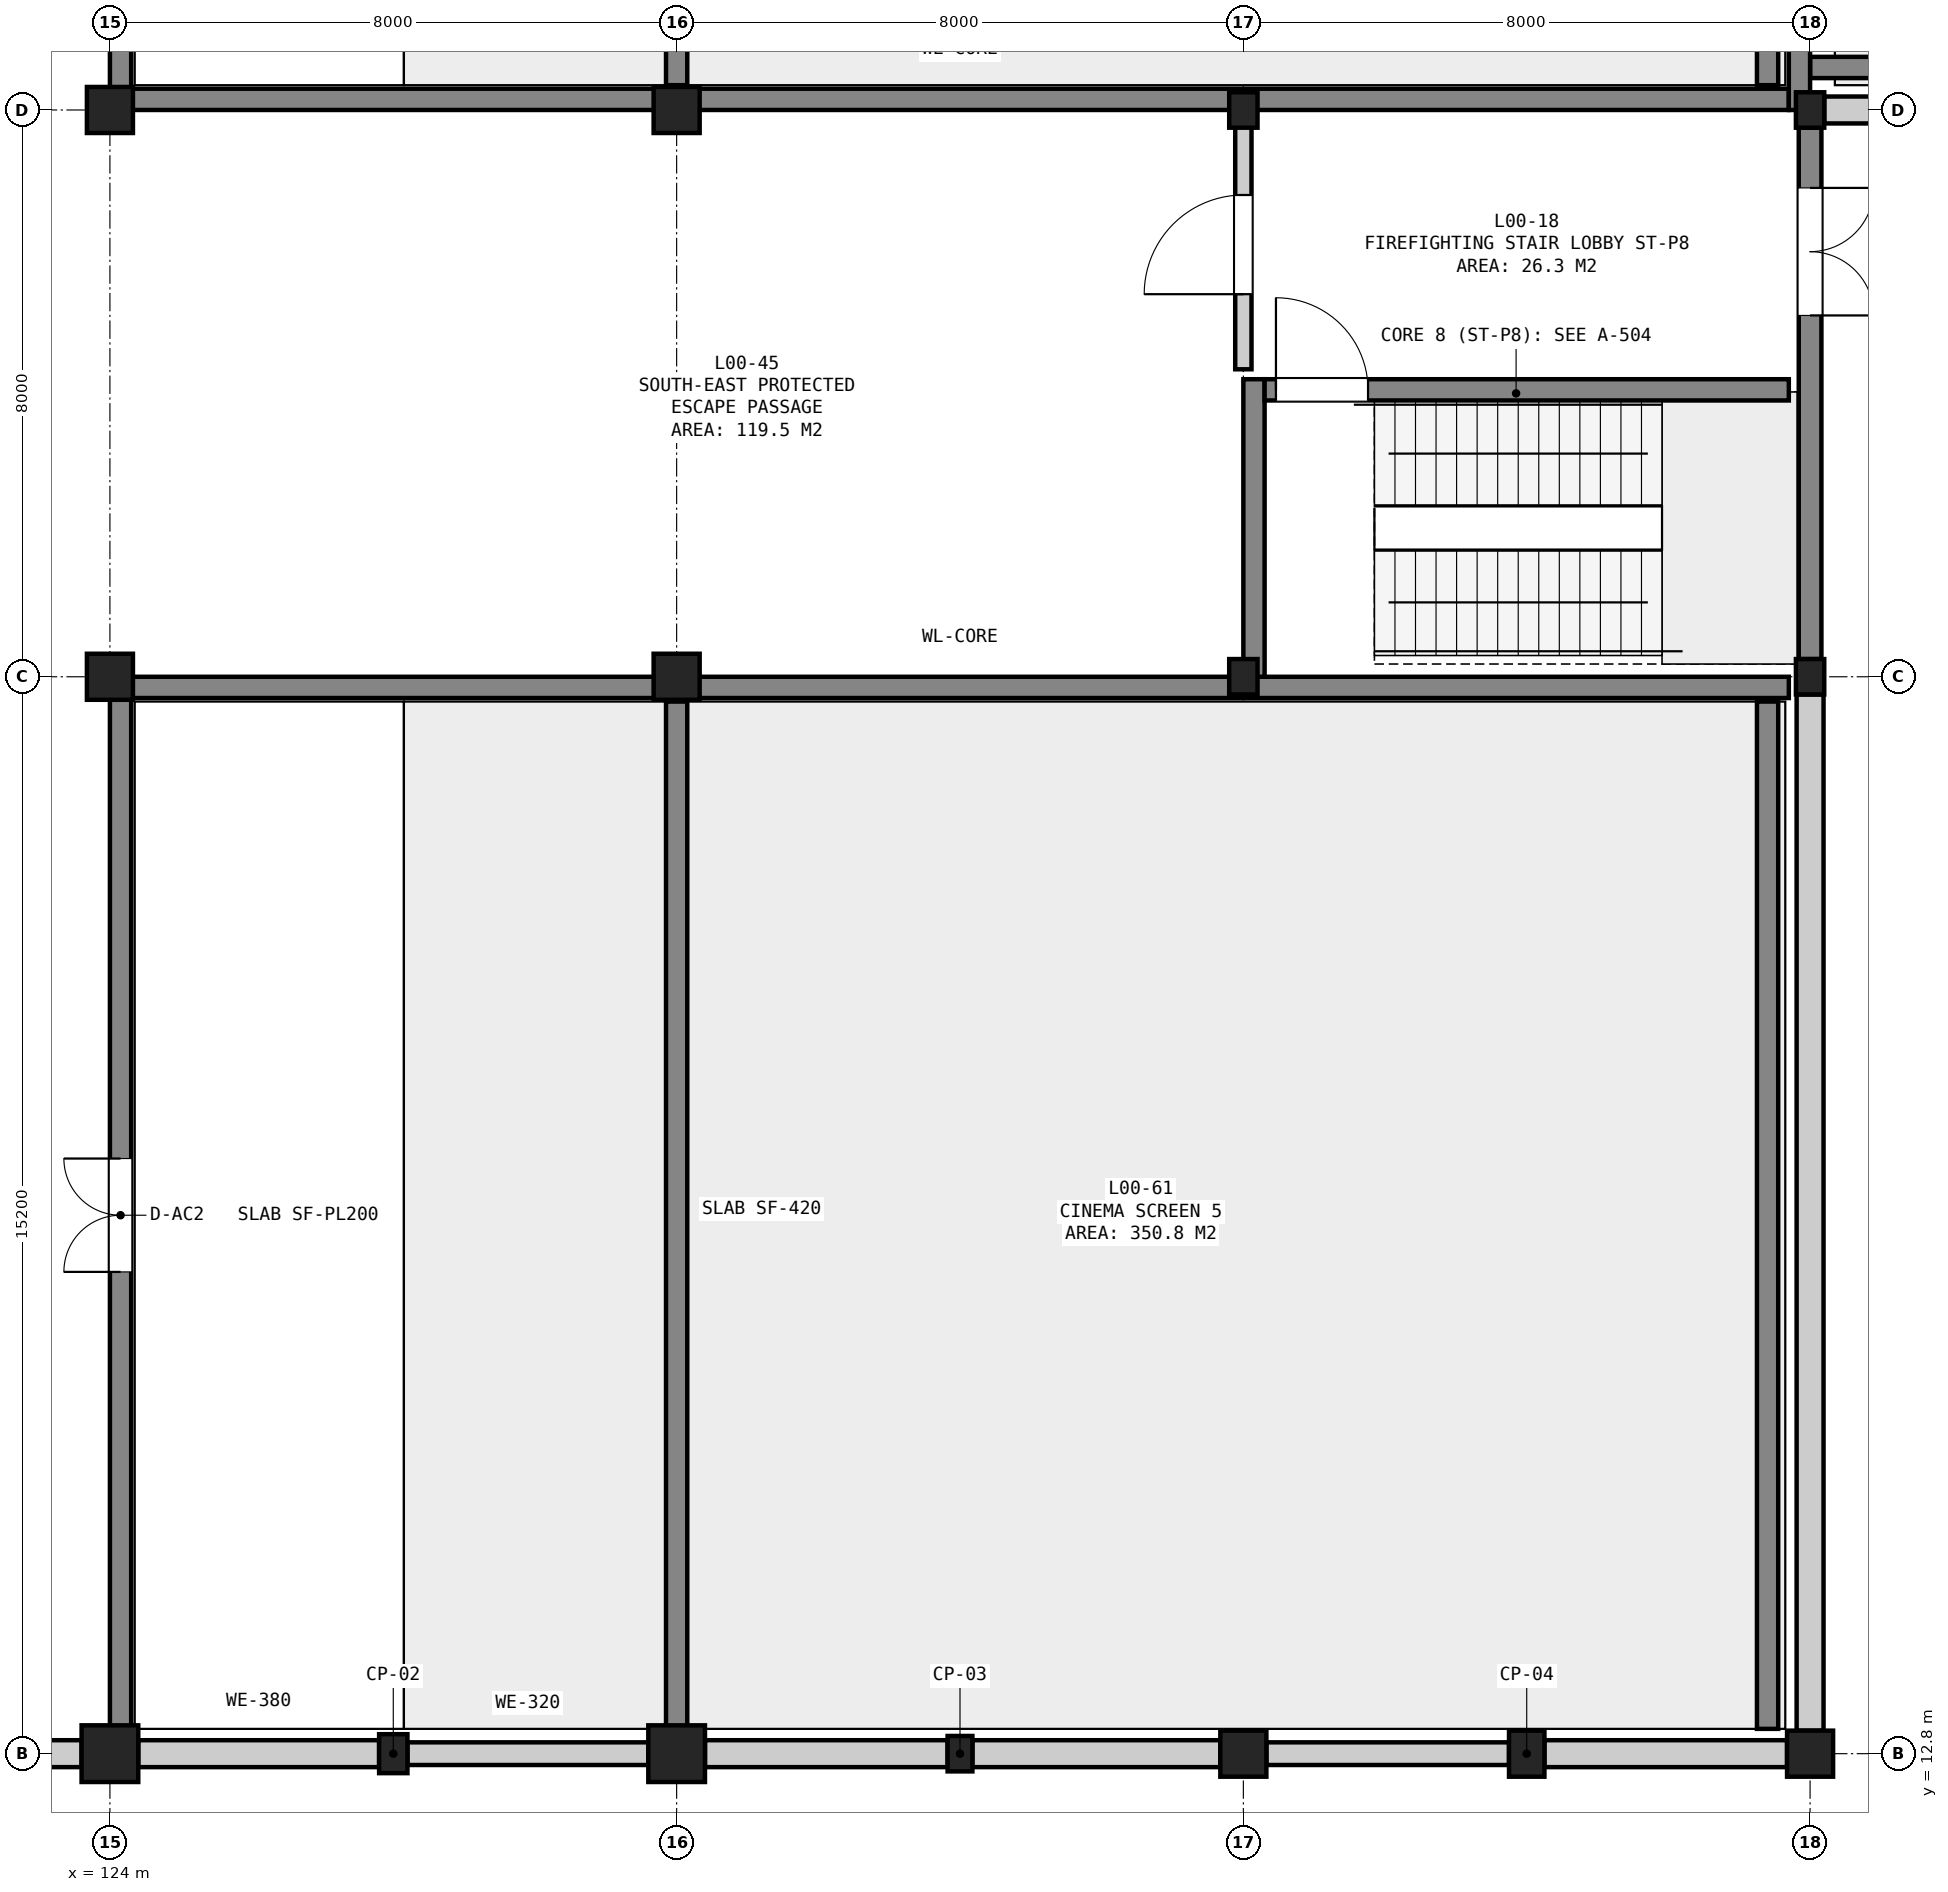
"""IFC4 building model, lengths in metres.
Left out: names, types, materials, properties, quantities, classifications, styles, units other than length and angle.
Written with IfcOpenShell. Run it as: python <this file> out.ifc"""

import sys

from ifc_helpers import new_model, si_unit, direction, frame, frame_2d, origin, origin_2d, place, context, subcontext, project, spatial, rectangle, extrude, element, fill, save


model = new_model("IFC4")
c1 = context("Model", 3, precision=1e-05, world=origin(), true_north=direction((0.0, 1.0)))
c2 = subcontext(c1, "Body", "Model", "MODEL_VIEW")
j1 = project(units=[si_unit("LENGTHUNIT", "METRE"), si_unit("PLANEANGLEUNIT", "RADIAN")], contexts=[c1])
p1 = place(None, origin())
s1 = spatial("IfcSite", under=j1, at=p1, CompositionType="ELEMENT")
p2 = place(p1, origin())
s2 = spatial("IfcBuilding", under=s1, at=p2, CompositionType="ELEMENT")
p3 = place(p2, origin())
s3 = spatial("IfcBuildingStorey", under=s2, at=p3, CompositionType="ELEMENT", Elevation=0.0)
p4 = place(p3, frame((124.0, 12.8, 0.0), z_axis=(0.0, 0.0, 1.0), x_axis=(1.0, 0.0, 0.0)))
e1 = element("IfcColumn", 1, at=p4, inside=s3, PredefinedType="COLUMN", context=c2, shape_type="SweptSolid", body=[
    extrude(rectangle(XDim=0.8, YDim=0.8, at=origin_2d()), origin(), (0.0, 0.0, 1.0), 5.4),
])
for number, where, z_axis, x_axis in (
    (2, (124.0, 28.0, 0.0), (0.0, 0.0, 1.0), (1.0, 0.0, 0.0)),
    (3, (124.0, 36.0, 0.0), (0.0, 0.0, 1.0), (1.0, 0.0, 0.0)),
):
    element("IfcColumn", number, at=place(p3, frame(where, z_axis=z_axis, x_axis=x_axis)), inside=s3, PredefinedType="COLUMN", context=c2, shape_type="SweptSolid", body=[
        extrude(rectangle(XDim=0.65, YDim=0.65, at=origin_2d()), origin(), (0.0, 0.0, 1.0), 5.4),
    ])
p5 = place(p3, frame((132.0, 12.8, 0.0), z_axis=(0.0, 0.0, 1.0), x_axis=(1.0, 0.0, 0.0)))
e4 = element("IfcColumn", 4, at=p5, inside=s3, PredefinedType="COLUMN", context=c2, shape_type="SweptSolid", body=[
    extrude(rectangle(XDim=0.8, YDim=0.8, at=origin_2d()), origin(), (0.0, 0.0, 1.0), 5.4),
])
for number, where, z_axis, x_axis in (
    (5, (132.0, 28.0, 0.0), (0.0, 0.0, 1.0), (1.0, 0.0, 0.0)),
    (6, (132.0, 36.0, 0.0), (0.0, 0.0, 1.0), (1.0, 0.0, 0.0)),
    (7, (140.0, 12.8, 0.0), (0.0, 0.0, 1.0), (1.0, 0.0, 0.0)),
):
    element("IfcColumn", number, at=place(p3, frame(where, z_axis=z_axis, x_axis=x_axis)), inside=s3, PredefinedType="COLUMN", context=c2, shape_type="SweptSolid", body=[
        extrude(rectangle(XDim=0.65, YDim=0.65, at=origin_2d()), origin(), (0.0, 0.0, 1.0), 5.4),
    ])
for number, where, z_axis, x_axis in (
    (8, (140.0, 28.0, 0.0), (0.0, 0.0, 1.0), (1.0, 0.0, 0.0)),
    (9, (140.0, 36.0, 0.0), (0.0, 0.0, 1.0), (1.0, 0.0, 0.0)),
):
    element("IfcColumn", number, at=place(p3, frame(where, z_axis=z_axis, x_axis=x_axis)), inside=s3, PredefinedType="COLUMN", context=c2, shape_type="SweptSolid", body=[
        extrude(rectangle(XDim=0.4, YDim=0.5, at=origin_2d()), origin(), (0.0, 0.0, 1.0), 5.4),
    ])
p6 = place(p3, frame((148.0, 12.8, 0.0), z_axis=(0.0, 0.0, 1.0), x_axis=(1.0, 0.0, 0.0)))
e10 = element("IfcColumn", 10, at=p6, inside=s3, PredefinedType="COLUMN", context=c2, shape_type="SweptSolid", body=[
    extrude(rectangle(XDim=0.65, YDim=0.65, at=origin_2d()), origin(), (0.0, 0.0, 1.0), 5.4),
])
for number, where, z_axis, x_axis in (
    (11, (148.0, 28.0, 0.0), (0.0, 0.0, 1.0), (1.0, 0.0, 0.0)),
    (12, (148.0, 36.0, 0.0), (0.0, 0.0, 1.0), (1.0, 0.0, 0.0)),
):
    element("IfcColumn", number, at=place(p3, frame(where, z_axis=z_axis, x_axis=x_axis)), inside=s3, PredefinedType="COLUMN", context=c2, shape_type="SweptSolid", body=[
        extrude(rectangle(XDim=0.4, YDim=0.5, at=origin_2d()), origin(), (0.0, 0.0, 1.0), 5.4),
    ])
p7 = place(p3, frame((128.0, 12.8, 0.0), z_axis=(0.0, 0.0, 1.0), x_axis=(1.0, 0.0, 0.0)))
e13 = element("IfcColumn", 13, at=p7, inside=s3, PredefinedType="PILASTER", context=c2, shape_type="SweptSolid", body=[
    extrude(rectangle(XDim=0.4, YDim=0.55, at=origin_2d()), origin(), (0.0, 0.0, 1.0), 5.4),
])
p8 = place(p3, frame((136.0, 12.8, 0.0), z_axis=(0.0, 0.0, 1.0), x_axis=(1.0, 0.0, 0.0)))
e14 = element("IfcColumn", 14, at=p8, inside=s3, PredefinedType="PILASTER", context=c2, shape_type="SweptSolid", body=[
    extrude(rectangle(XDim=0.35, YDim=0.5, at=origin_2d()), origin(), (0.0, 0.0, 1.0), 5.4),
])
p9 = place(p3, frame((144.0, 12.8, 0.0), z_axis=(0.0, 0.0, 1.0), x_axis=(1.0, 0.0, 0.0)))
e15 = element("IfcColumn", 15, at=p9, inside=s3, PredefinedType="PILASTER", context=c2, shape_type="SweptSolid", body=[
    extrude(rectangle(XDim=0.5, YDim=0.65, at=origin_2d()), origin(), (0.0, 0.0, 1.0), 5.4),
])
p10 = place(p3, frame((132.0, 13.15, 0.0), z_axis=(0.0, 0.0, 1.0), x_axis=(0.0, 1.0, 0.0)))
e16 = element("IfcWall", 16, at=p10, inside=s3, PredefinedType="SHEAR", context=c2, shape_type="SweptSolid", body=[
    extrude(rectangle(XDim=14.5, YDim=0.3, at=frame_2d((7.25, 0.0))), origin(), (0.0, 0.0, 1.0), 0.75),
])
p11 = place(p3, frame((147.4, 13.15, 0.0), z_axis=(0.0, 0.0, 1.0), x_axis=(0.0, 1.0, 0.0)))
e17 = element("IfcWall", 17, at=p11, inside=s3, PredefinedType="SHEAR", context=c2, shape_type="SweptSolid", body=[
    extrude(rectangle(XDim=14.5, YDim=0.3, at=frame_2d((7.25, 0.0))), origin(), (0.0, 0.0, 1.0), 2.871),
])
p12 = place(p3, frame((132.0, 36.35, 0.0), z_axis=(0.0, 0.0, 1.0), x_axis=(0.0, 1.0, 0.0)))
e18 = element("IfcWall", 18, at=p12, inside=s3, PredefinedType="SHEAR", context=c2, shape_type="SweptSolid", body=[
    extrude(rectangle(XDim=14.5, YDim=0.3, at=frame_2d((7.25, 0.0))), origin(), (0.0, 0.0, 1.0), 0.75),
])
p13 = place(p3, frame((147.4, 36.35, 0.0), z_axis=(0.0, 0.0, 1.0), x_axis=(0.0, 1.0, 0.0)))
e19 = element("IfcWall", 19, at=p13, inside=s3, PredefinedType="SHEAR", context=c2, shape_type="SweptSolid", body=[
    extrude(rectangle(XDim=14.5, YDim=0.3, at=frame_2d((7.25, 0.0))), origin(), (0.0, 0.0, 1.0), 2.871),
])
p14 = place(p3, frame((148.0, 36.6, 0.0), z_axis=(0.0, 0.0, 1.0), x_axis=(1.0, 0.0, 0.0)))
e20 = element("IfcWall", 20, at=p14, inside=s3, PredefinedType="SHEAR", context=c2, shape_type="SweptSolid", body=[
    extrude(rectangle(XDim=13.25, YDim=0.3, at=frame_2d((6.625, 0.0))), origin(), (0.0, 0.0, 1.0), 2.816),
])
p15 = place(p3, frame((120.625, 12.8, 0.0), z_axis=(0.0, 0.0, 1.0), x_axis=(1.0, 0.0, 0.0)))
e21 = element("IfcWall", 21, at=p15, inside=s3, PredefinedType="SOLIDWALL", context=c2, shape_type="SweptSolid", body=[
    extrude(rectangle(XDim=2.975, YDim=0.38, at=frame_2d((1.488, 0.0))), origin(), (0.0, 0.0, 1.0), 4.48),
])
p16 = place(p15, frame((0.575, 0.0, 0.0)))
e22 = element("IfcOpeningElement", 22, at=p16, cuts=e21, PredefinedType="OPENING", context=c2, shape_type="SweptSolid", body=[
    extrude(rectangle(XDim=1.8, YDim=2.25, at=frame_2d((0.9, 1.125))), frame((0.0, 0.202, 0.0), z_axis=(0.0, -1.0, 0.0), x_axis=(1.0, 0.0, 0.0)), (0.0, 0.0, 1.0), 0.404),
])
p17 = place(p3, frame((124.4, 12.8, 0.0), z_axis=(0.0, 0.0, 1.0), x_axis=(1.0, 0.0, 0.0)))
e23 = element("IfcWall", 23, at=p17, inside=s3, PredefinedType="SOLIDWALL", context=c2, shape_type="SweptSolid", body=[
    extrude(rectangle(XDim=3.4, YDim=0.38, at=frame_2d((1.7, 0.0))), origin(), (0.0, 0.0, 1.0), 4.555),
])
p18 = place(p3, frame((128.2, 12.8, 0.0), z_axis=(0.0, 0.0, 1.0), x_axis=(1.0, 0.0, 0.0)))
e24 = element("IfcWall", 24, at=p18, inside=s3, PredefinedType="SOLIDWALL", context=c2, shape_type="SweptSolid", body=[
    extrude(rectangle(XDim=3.4, YDim=0.32, at=frame_2d((1.7, 0.0))), origin(), (0.0, 0.0, 1.0), 4.555),
])
p19 = place(p3, frame((132.4, 12.8, 0.0), z_axis=(0.0, 0.0, 1.0), x_axis=(1.0, 0.0, 0.0)))
e25 = element("IfcWall", 25, at=p19, inside=s3, PredefinedType="SOLIDWALL", context=c2, shape_type="SweptSolid", body=[
    extrude(rectangle(XDim=3.425, YDim=0.38, at=frame_2d((1.712, 0.0))), origin(), (0.0, 0.0, 1.0), 4.775),
])
p20 = place(p3, frame((136.175, 12.8, 0.0), z_axis=(0.0, 0.0, 1.0), x_axis=(1.0, 0.0, 0.0)))
e26 = element("IfcWall", 26, at=p20, inside=s3, PredefinedType="SOLIDWALL", context=c2, shape_type="SweptSolid", body=[
    extrude(rectangle(XDim=3.5, YDim=0.38, at=frame_2d((1.75, 0.0))), origin(), (0.0, 0.0, 1.0), 4.775),
])
p21 = place(p3, frame((140.325, 12.8, 0.0), z_axis=(0.0, 0.0, 1.0), x_axis=(1.0, 0.0, 0.0)))
e27 = element("IfcWall", 27, at=p21, inside=s3, PredefinedType="SOLIDWALL", context=c2, shape_type="SweptSolid", body=[
    extrude(rectangle(XDim=3.425, YDim=0.32, at=frame_2d((1.712, 0.0))), origin(), (0.0, 0.0, 1.0), 4.475),
])
p22 = place(p3, frame((144.25, 12.8, 0.0), z_axis=(0.0, 0.0, 1.0), x_axis=(1.0, 0.0, 0.0)))
e28 = element("IfcWall", 28, at=p22, inside=s3, PredefinedType="SOLIDWALL", context=c2, shape_type="SweptSolid", body=[
    extrude(rectangle(XDim=3.425, YDim=0.38, at=frame_2d((1.712, 0.0))), origin(), (0.0, 0.0, 1.0), 4.475),
])
p23 = place(p3, frame((148.0, 13.125, 0.0), z_axis=(0.0, 0.0, 1.0), x_axis=(0.0, 1.0, 0.0)))
e29 = element("IfcWall", 29, at=p23, inside=s3, PredefinedType="SOLIDWALL", context=c2, shape_type="SweptSolid", body=[
    extrude(rectangle(XDim=14.625, YDim=0.38, at=frame_2d((7.312, 0.0))), origin(), (0.0, 0.0, 1.0), 4.075),
])
p24 = place(p3, frame((148.0, 28.25, 0.0), z_axis=(0.0, 0.0, 1.0), x_axis=(0.0, 1.0, 0.0)))
e30 = element("IfcWall", 30, at=p24, inside=s3, PredefinedType="SOLIDWALL", context=c2, shape_type="SweptSolid", body=[
    extrude(rectangle(XDim=7.5, YDim=0.32, at=frame_2d((3.75, 0.0))), origin(), (0.0, 0.0, 1.0), 4.555),
])
p25 = place(p24, frame((4.85, 0.0, 0.0)))
e31 = element("IfcOpeningElement", 31, at=p25, cuts=e30, PredefinedType="OPENING", context=c2, shape_type="SweptSolid", body=[
    extrude(rectangle(XDim=1.8, YDim=2.25, at=frame_2d((0.9, 1.125))), frame((0.0, 0.172, 0.0), z_axis=(0.0, -1.0, 0.0), x_axis=(1.0, 0.0, 0.0)), (0.0, 0.0, 1.0), 0.344),
])
p26 = place(p3, frame((148.2, 36.0, 0.0), z_axis=(0.0, 0.0, 1.0), x_axis=(1.0, 0.0, 0.0)))
e32 = element("IfcWall", 32, at=p26, inside=s3, PredefinedType="SOLIDWALL", context=c2, shape_type="SweptSolid", body=[
    extrude(rectangle(XDim=13.0, YDim=0.38, at=frame_2d((6.5, 0.0))), origin(), (0.0, 0.0, 1.0), 4.025),
])
p27 = place(p3, frame((124.3, 27.85, 0.0), z_axis=(0.0, 0.0, 1.0), x_axis=(1.0, 0.0, 0.0)))
e33 = element("IfcWall", 33, at=p27, inside=s3, PredefinedType="SHEAR", context=c2, shape_type="SweptSolid", body=[
    extrude(rectangle(XDim=23.4, YDim=0.3, at=frame_2d((11.7, 0.0))), origin(), (0.0, 0.0, 1.0), 5.08),
])
p28 = place(p3, frame((124.15, 12.8, 0.0), z_axis=(0.0, 0.0, 1.0), x_axis=(0.0, 1.0, 0.0)))
e34 = element("IfcWall", 34, at=p28, inside=s3, PredefinedType="SHEAR", context=c2, shape_type="SweptSolid", body=[
    extrude(rectangle(XDim=15.2, YDim=0.3, at=frame_2d((7.6, 0.0))), origin(), (0.0, 0.0, 1.0), 5.08),
])
p29 = place(p28, frame((6.8, 0.0, 0.0)))
e35 = element("IfcOpeningElement", 35, at=p29, cuts=e34, PredefinedType="OPENING", context=c2, shape_type="SweptSolid", body=[
    extrude(rectangle(XDim=1.6, YDim=2.25, at=frame_2d((0.8, 1.125))), frame((0.0, 0.162, 0.0), z_axis=(0.0, -1.0, 0.0), x_axis=(1.0, 0.0, 0.0)), (0.0, 0.0, 1.0), 0.324),
])
p30 = place(p3, frame((124.3, 36.15, 0.0), z_axis=(0.0, 0.0, 1.0), x_axis=(1.0, 0.0, 0.0)))
e36 = element("IfcWall", 36, at=p30, inside=s3, PredefinedType="SHEAR", context=c2, shape_type="SweptSolid", body=[
    extrude(rectangle(XDim=23.4, YDim=0.3, at=frame_2d((11.7, 0.0))), origin(), (0.0, 0.0, 1.0), 5.08),
])
p31 = place(p3, frame((124.15, 36.0, 0.0), z_axis=(0.0, 0.0, 1.0), x_axis=(0.0, 1.0, 0.0)))
e37 = element("IfcWall", 37, at=p31, inside=s3, PredefinedType="SHEAR", context=c2, shape_type="SweptSolid", body=[
    extrude(rectangle(XDim=15.2, YDim=0.3, at=frame_2d((7.6, 0.0))), origin(), (0.0, 0.0, 1.0), 5.08),
])
p32 = place(p31, frame((10.4, 0.0, 0.0)))
e38 = element("IfcOpeningElement", 38, at=p32, cuts=e37, PredefinedType="OPENING", context=c2, shape_type="SweptSolid", body=[
    extrude(rectangle(XDim=1.6, YDim=2.25, at=frame_2d((0.8, 1.125))), frame((0.0, 0.162, 0.0), z_axis=(0.0, -1.0, 0.0), x_axis=(1.0, 0.0, 0.0)), (0.0, 0.0, 1.0), 0.324),
])
p33 = place(p3, frame((147.85, 36.0, 0.0), z_axis=(0.0, 0.0, 1.0), x_axis=(0.0, 1.0, 0.0)))
e39 = element("IfcWall", 39, at=p33, inside=s3, PredefinedType="SHEAR", context=c2, shape_type="SweptSolid", body=[
    extrude(rectangle(XDim=15.2, YDim=0.3, at=frame_2d((7.6, 0.0))), origin(), (0.0, 0.0, 1.0), 5.08),
])
p34 = place(p3, frame((140.15, 28.0, 0.0), z_axis=(0.0, 0.0, 1.0), x_axis=(0.0, 1.0, 0.0)))
e40 = element("IfcWall", 40, at=p34, inside=s3, PredefinedType="SHEAR", context=c2, shape_type="SweptSolid", body=[
    extrude(rectangle(XDim=4.2, YDim=0.3, at=frame_2d((2.1, 0.0))), origin(), (0.0, 0.0, 1.0), 5.08),
])
p35 = place(p3, frame((140.3, 32.05, 0.0), z_axis=(0.0, 0.0, 1.0), x_axis=(1.0, 0.0, 0.0)))
e41 = element("IfcWall", 41, at=p35, inside=s3, PredefinedType="SHEAR", context=c2, shape_type="SweptSolid", body=[
    extrude(rectangle(XDim=7.4, YDim=0.3, at=frame_2d((3.7, 0.0))), origin(), (0.0, 0.0, 1.0), 5.08),
])
p36 = place(p35, frame((0.16, 0.0, 0.0)))
e42 = element("IfcOpeningElement", 42, at=p36, cuts=e41, PredefinedType="OPENING", context=c2, shape_type="SweptSolid", body=[
    extrude(rectangle(XDim=1.3, YDim=2.18, at=frame_2d((0.65, 1.09))), frame((0.0, 0.162, 0.0), z_axis=(0.0, -1.0, 0.0), x_axis=(1.0, 0.0, 0.0)), (0.0, 0.0, 1.0), 0.324),
])
p37 = place(p3, frame((140.0, 32.34, 0.0), z_axis=(0.0, 0.0, 1.0), x_axis=(0.0, 1.0, 0.0)))
e43 = element("IfcWall", 43, at=p37, inside=s3, PredefinedType="SOLIDWALL", context=c2, shape_type="SweptSolid", body=[
    extrude(rectangle(XDim=3.52, YDim=0.23, at=frame_2d((1.76, 0.0))), origin(), (0.0, 0.0, 1.0), 4.575),
])
p38 = place(p37, frame((1.06, 0.0, 0.0)))
e44 = element("IfcOpeningElement", 44, at=p38, cuts=e43, PredefinedType="OPENING", context=c2, shape_type="SweptSolid", body=[
    extrude(rectangle(XDim=1.4, YDim=2.2, at=frame_2d((0.7, 1.1))), frame((0.0, 0.127, 0.0), z_axis=(0.0, -1.0, 0.0), x_axis=(1.0, 0.0, 0.0)), (0.0, 0.0, 1.0), 0.254),
])
p39 = place(p25, frame((1.8, 0.0, 0.0), z_axis=(0.0, 0.0, 1.0), x_axis=(-1.0, 0.0, 0.0)))
e45 = element("IfcDoor", 45, at=p39, inside=s3, OperationType="DOUBLE_DOOR_SINGLE_SWING", PredefinedType="DOOR", context=c2, shape_type="SweptSolid", body=[
    extrude(rectangle(XDim=1.8, YDim=2.25, at=frame_2d((0.9, 1.125))), frame((0.0, 0.025, 0.0), z_axis=(0.0, -1.0, 0.0), x_axis=(1.0, 0.0, 0.0)), (0.0, 0.0, 1.0), 0.05),
])
fill(e31, e45)
p40 = place(p29, origin())
e46 = element("IfcDoor", 46, at=p40, inside=s3, OperationType="DOUBLE_DOOR_SINGLE_SWING", PredefinedType="DOOR", context=c2, shape_type="SweptSolid", body=[
    extrude(rectangle(XDim=1.6, YDim=2.25, at=frame_2d((0.8, 1.125))), frame((0.0, 0.025, 0.0), z_axis=(0.0, -1.0, 0.0), x_axis=(1.0, 0.0, 0.0)), (0.0, 0.0, 1.0), 0.05),
])
fill(e35, e46)
p41 = place(p36, origin())
e47 = element("IfcDoor", 47, at=p41, inside=s3, OperationType="SINGLE_SWING_LEFT", PredefinedType="DOOR", context=c2, shape_type="SweptSolid", body=[
    extrude(rectangle(XDim=1.3, YDim=2.18, at=frame_2d((0.65, 1.09))), frame((0.0, 0.025, 0.0), z_axis=(0.0, -1.0, 0.0), x_axis=(1.0, 0.0, 0.0)), (0.0, 0.0, 1.0), 0.05),
])
fill(e42, e47)
p42 = place(p38, origin())
e48 = element("IfcDoor", 48, at=p42, inside=s3, OperationType="SINGLE_SWING_LEFT", PredefinedType="DOOR", context=c2, shape_type="SweptSolid", body=[
    extrude(rectangle(XDim=1.4, YDim=2.2, at=frame_2d((0.7, 1.1))), frame((0.0, 0.025, 0.0), z_axis=(0.0, -1.0, 0.0), x_axis=(1.0, 0.0, 0.0)), (0.0, 0.0, 1.0), 0.05),
])
fill(e44, e48)
save(model, sys.argv[1])
